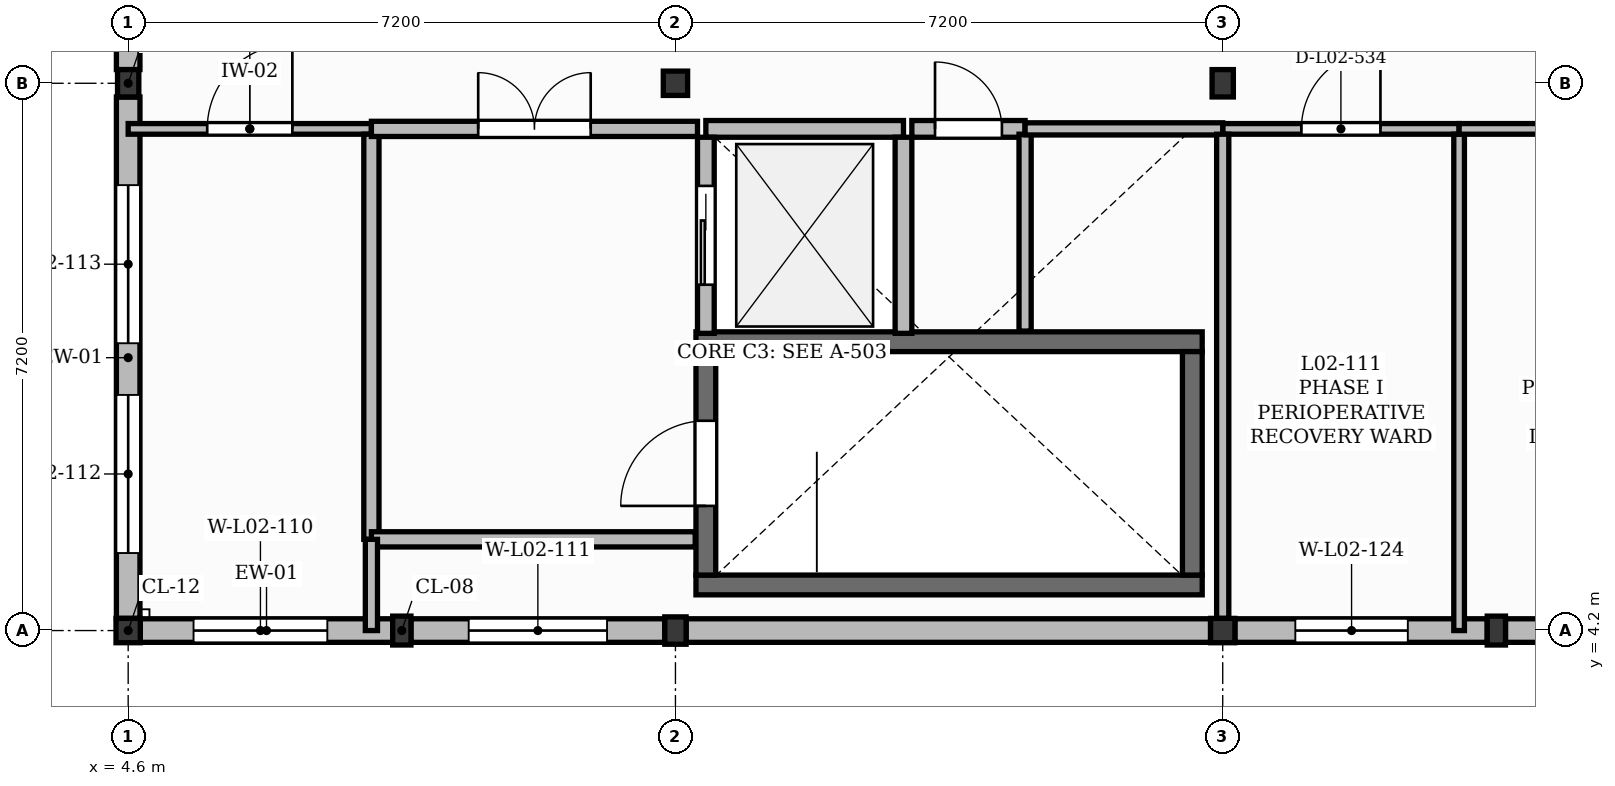
"""IFC4 building model, lengths in metres.
Left out: names, types, materials, properties, quantities, classifications, styles, units other than length and angle.
Written with IfcOpenShell. Run it as: python <this file> out.ifc"""

import sys

from ifc_helpers import new_model, si_unit, direction, frame, frame_2d, origin, origin_2d, place, context, subcontext, project, spatial, rectangle, extrude, element, fill, save


model = new_model("IFC4")
c1 = context("Model", 3, precision=1e-05, world=origin(), true_north=direction((0.0, 1.0)))
c2 = subcontext(c1, "Body", "Model", "MODEL_VIEW")
j1 = project(units=[si_unit("LENGTHUNIT", "METRE"), si_unit("PLANEANGLEUNIT", "RADIAN")], contexts=[c1])
p1 = place(None, origin())
s1 = spatial("IfcSite", under=j1, at=p1, CompositionType="ELEMENT")
p2 = place(p1, origin())
s2 = spatial("IfcBuilding", under=s1, at=p2, CompositionType="ELEMENT")
p3 = place(p2, frame((0.0, 0.0, 9.0)))
s3 = spatial("IfcBuildingStorey", under=s2, at=p3, CompositionType="ELEMENT", Elevation=9.0)
p4 = place(p3, frame((4.6, 4.2, 0.0), z_axis=(0.0, 0.0, 1.0), x_axis=(1.0, 0.0, 0.0)))
e1 = element("IfcColumn", 1, at=p4, inside=s3, PredefinedType="COLUMN", context=c2, shape_type="SweptSolid", body=[
    extrude(rectangle(XDim=0.32, YDim=0.32, at=origin_2d()), origin(), (0.0, 0.0, 1.0), 3.95),
])
for number, where, z_axis, x_axis in (
    (2, (4.6, 11.4, 0.0), (0.0, 0.0, 1.0), (1.0, 0.0, 0.0)),
    (3, (11.8, 4.2, 0.0), (0.0, 0.0, 1.0), (1.0, 0.0, 0.0)),
):
    element("IfcColumn", number, at=place(p3, frame(where, z_axis=z_axis, x_axis=x_axis)), inside=s3, PredefinedType="COLUMN", context=c2, shape_type="SweptSolid", body=[
        extrude(rectangle(XDim=0.28, YDim=0.36, at=origin_2d()), origin(), (0.0, 0.0, 1.0), 3.95),
    ])
for number, where, z_axis, x_axis in (
    (4, (11.8, 11.4, 0.0), (0.0, 0.0, 1.0), (1.0, 0.0, 0.0)),
    (5, (19.0, 4.2, 0.0), (0.0, 0.0, 1.0), (1.0, 0.0, 0.0)),
):
    element("IfcColumn", number, at=place(p3, frame(where, z_axis=z_axis, x_axis=x_axis)), inside=s3, PredefinedType="COLUMN", context=c2, shape_type="SweptSolid", body=[
        extrude(rectangle(XDim=0.32, YDim=0.32, at=origin_2d()), origin(), (0.0, 0.0, 1.0), 3.95),
    ])
p5 = place(p3, frame((19.0, 11.4, 0.0), z_axis=(0.0, 0.0, 1.0), x_axis=(1.0, 0.0, 0.0)))
e6 = element("IfcColumn", 6, at=p5, inside=s3, PredefinedType="COLUMN", context=c2, shape_type="SweptSolid", body=[
    extrude(rectangle(XDim=0.28, YDim=0.36, at=origin_2d()), origin(), (0.0, 0.0, 1.0), 3.95),
])
for number, where, z_axis, x_axis in (
    (7, (8.2, 4.2, 0.0), (0.0, 0.0, 1.0), (1.0, 0.0, 0.0)),
    (8, (22.6, 4.2, 0.0), (0.0, 0.0, 1.0), (1.0, 0.0, 0.0)),
):
    element("IfcColumn", number, at=place(p3, frame(where, z_axis=z_axis, x_axis=x_axis)), inside=s3, PredefinedType="PILASTER", context=c2, shape_type="SweptSolid", body=[
        extrude(rectangle(XDim=0.24, YDim=0.38, at=origin_2d()), origin(), (0.0, 0.0, 1.0), 3.95),
    ])
p6 = place(p3, frame((4.76, 4.2, 0.0), z_axis=(0.0, 0.0, 1.0), x_axis=(1.0, 0.0, 0.0)))
e9 = element("IfcWall", 9, at=p6, inside=s3, PredefinedType="SOLIDWALL", context=c2, shape_type="SweptSolid", body=[
    extrude(rectangle(XDim=3.32, YDim=0.31, at=frame_2d((1.66, 0.0))), origin(), (0.0, 0.0, 1.0), 3.49),
])
p7 = place(p6, frame((0.7, 0.0, 1.0)))
e10 = element("IfcOpeningElement", 10, at=p7, cuts=e9, PredefinedType="OPENING", context=c2, shape_type="SweptSolid", body=[
    extrude(rectangle(XDim=1.76, YDim=1.95, at=frame_2d((0.88, 0.975))), frame((0.0, 0.165, 0.0), z_axis=(0.0, -1.0, 0.0), x_axis=(1.0, 0.0, 0.0)), (0.0, 0.0, 1.0), 0.33),
])
p8 = place(p3, frame((8.32, 4.2, 0.0), z_axis=(0.0, 0.0, 1.0), x_axis=(1.0, 0.0, 0.0)))
e11 = element("IfcWall", 11, at=p8, inside=s3, PredefinedType="SOLIDWALL", context=c2, shape_type="SweptSolid", body=[
    extrude(rectangle(XDim=3.34, YDim=0.31, at=frame_2d((1.67, 0.0))), origin(), (0.0, 0.0, 1.0), 3.49),
])
p9 = place(p8, frame((0.76, 0.0, 1.05)))
e12 = element("IfcOpeningElement", 12, at=p9, cuts=e11, PredefinedType="OPENING", context=c2, shape_type="SweptSolid", body=[
    extrude(rectangle(XDim=1.82, YDim=1.65, at=frame_2d((0.91, 0.825))), frame((0.0, 0.165, 0.0), z_axis=(0.0, -1.0, 0.0), x_axis=(1.0, 0.0, 0.0)), (0.0, 0.0, 1.0), 0.33),
])
p10 = place(p3, frame((4.6, 4.36, 0.0), z_axis=(0.0, 0.0, 1.0), x_axis=(0.0, 1.0, 0.0)))
e13 = element("IfcWall", 13, at=p10, inside=s3, PredefinedType="SOLIDWALL", context=c2, shape_type="SweptSolid", body=[
    extrude(rectangle(XDim=6.86, YDim=0.31, at=frame_2d((3.43, 0.0))), origin(), (0.0, 0.0, 1.0), 3.49),
])
p11 = place(p10, frame((0.86, 0.0, 1.0)))
e14 = element("IfcOpeningElement", 14, at=p11, cuts=e13, PredefinedType="OPENING", context=c2, shape_type="SweptSolid", body=[
    extrude(rectangle(XDim=2.08, YDim=1.8, at=frame_2d((1.04, 0.9))), frame((0.0, 0.165, 0.0), z_axis=(0.0, -1.0, 0.0), x_axis=(1.0, 0.0, 0.0)), (0.0, 0.0, 1.0), 0.33),
])
p12 = place(p10, frame((3.62, 0.0, 1.0)))
e15 = element("IfcOpeningElement", 15, at=p12, cuts=e13, PredefinedType="OPENING", context=c2, shape_type="SweptSolid", body=[
    extrude(rectangle(XDim=2.08, YDim=1.8, at=frame_2d((1.04, 0.9))), frame((0.0, 0.165, 0.0), z_axis=(0.0, -1.0, 0.0), x_axis=(1.0, 0.0, 0.0)), (0.0, 0.0, 1.0), 0.33),
])
p13 = place(p3, frame((4.6, 11.58, 0.0), z_axis=(0.0, 0.0, 1.0), x_axis=(0.0, 1.0, 0.0)))
e16 = element("IfcWall", 16, at=p13, inside=s3, PredefinedType="SOLIDWALL", context=c2, shape_type="SweptSolid", body=[
    extrude(rectangle(XDim=6.86, YDim=0.31, at=frame_2d((3.43, 0.0))), origin(), (0.0, 0.0, 1.0), 3.49),
])
p14 = place(p13, frame((3.65, 0.0, 1.05)))
e17 = element("IfcOpeningElement", 17, at=p14, cuts=e16, PredefinedType="OPENING", context=c2, shape_type="SweptSolid", body=[
    extrude(rectangle(XDim=1.26, YDim=1.65, at=frame_2d((0.63, 0.825))), frame((0.0, 0.165, 0.0), z_axis=(0.0, -1.0, 0.0), x_axis=(1.0, 0.0, 0.0)), (0.0, 0.0, 1.0), 0.33),
])
p15 = place(p3, frame((11.94, 4.2, 0.0), z_axis=(0.0, 0.0, 1.0), x_axis=(1.0, 0.0, 0.0)))
e18 = element("IfcWall", 18, at=p15, inside=s3, PredefinedType="SOLIDWALL", context=c2, shape_type="SweptSolid", body=[
    extrude(rectangle(XDim=6.9, YDim=0.31, at=frame_2d((3.45, 0.0))), origin(), (0.0, 0.0, 1.0), 3.49),
])
p16 = place(p3, frame((19.16, 4.2, 0.0), z_axis=(0.0, 0.0, 1.0), x_axis=(1.0, 0.0, 0.0)))
e19 = element("IfcWall", 19, at=p16, inside=s3, PredefinedType="SOLIDWALL", context=c2, shape_type="SweptSolid", body=[
    extrude(rectangle(XDim=3.32, YDim=0.31, at=frame_2d((1.66, 0.0))), origin(), (0.0, 0.0, 1.0), 3.49),
])
p17 = place(p16, frame((0.795, 0.0, 1.0)))
e20 = element("IfcOpeningElement", 20, at=p17, cuts=e19, PredefinedType="OPENING", context=c2, shape_type="SweptSolid", body=[
    extrude(rectangle(XDim=1.48, YDim=1.95, at=frame_2d((0.74, 0.975))), frame((0.0, 0.165, 0.0), z_axis=(0.0, -1.0, 0.0), x_axis=(1.0, 0.0, 0.0)), (0.0, 0.0, 1.0), 0.33),
])
p18 = place(p3, frame((22.72, 4.2, 0.0), z_axis=(0.0, 0.0, 1.0), x_axis=(1.0, 0.0, 0.0)))
e21 = element("IfcWall", 21, at=p18, inside=s3, PredefinedType="SOLIDWALL", context=c2, shape_type="SweptSolid", body=[
    extrude(rectangle(XDim=3.34, YDim=0.31, at=frame_2d((1.67, 0.0))), origin(), (0.0, 0.0, 1.0), 3.49),
])
p19 = place(p18, frame((0.86, 0.0, 1.0)))
e22 = element("IfcOpeningElement", 22, at=p19, cuts=e21, PredefinedType="OPENING", context=c2, shape_type="SweptSolid", body=[
    extrude(rectangle(XDim=1.62, YDim=1.95, at=frame_2d((0.81, 0.975))), frame((0.0, 0.165, 0.0), z_axis=(0.0, -1.0, 0.0), x_axis=(1.0, 0.0, 0.0)), (0.0, 0.0, 1.0), 0.33),
])
for number, where, z_axis, x_axis in (
    (23, (12.07, 4.8, 0.0), (0.0, 0.0, 1.0), (1.0, 0.0, 0.0)),
    (24, (12.07, 8.0, 0.0), (0.0, 0.0, 1.0), (1.0, 0.0, 0.0)),
):
    element("IfcWall", number, at=place(p3, frame(where, z_axis=z_axis, x_axis=x_axis)), inside=s3, PredefinedType="SHEAR", context=c2, shape_type="SweptSolid", body=[
        extrude(rectangle(XDim=6.66, YDim=0.26, at=frame_2d((3.33, 0.0))), origin(), (0.0, 0.0, 1.0), 3.95),
    ])
p20 = place(p3, frame((12.2, 4.93, 0.0), z_axis=(0.0, 0.0, 1.0), x_axis=(0.0, 1.0, 0.0)))
e25 = element("IfcWall", 25, at=p20, inside=s3, PredefinedType="SHEAR", context=c2, shape_type="SweptSolid", body=[
    extrude(rectangle(XDim=2.94, YDim=0.26, at=frame_2d((1.47, 0.0))), origin(), (0.0, 0.0, 1.0), 3.95),
])
p21 = place(p20, frame((0.91, 0.0, 0.0)))
e26 = element("IfcOpeningElement", 26, at=p21, cuts=e25, PredefinedType="OPENING", context=c2, shape_type="SweptSolid", body=[
    extrude(rectangle(XDim=1.12, YDim=2.1, at=frame_2d((0.56, 1.05))), frame((0.0, 0.14, 0.0), z_axis=(0.0, -1.0, 0.0), x_axis=(1.0, 0.0, 0.0)), (0.0, 0.0, 1.0), 0.28),
])
p22 = place(p3, frame((18.6, 4.93, 0.0), z_axis=(0.0, 0.0, 1.0), x_axis=(0.0, 1.0, 0.0)))
e27 = element("IfcWall", 27, at=p22, inside=s3, PredefinedType="SHEAR", context=c2, shape_type="SweptSolid", body=[
    extrude(rectangle(XDim=2.94, YDim=0.26, at=frame_2d((1.47, 0.0))), origin(), (0.0, 0.0, 1.0), 3.95),
])
p23 = place(p3, frame((12.2, 10.8, 0.0), z_axis=(0.0, 0.0, 1.0), x_axis=(1.0, 0.0, 0.0)))
e28 = element("IfcWall", 28, at=p23, inside=s3, PredefinedType="SOLIDWALL", context=c2, shape_type="SweptSolid", body=[
    extrude(rectangle(XDim=2.6, YDim=0.22, at=frame_2d((1.3, 0.0))), origin(), (0.0, 0.0, 1.0), 3.95),
])
p24 = place(p3, frame((12.2, 8.11, 0.0), z_axis=(0.0, 0.0, 1.0), x_axis=(0.0, 1.0, 0.0)))
e29 = element("IfcWall", 29, at=p24, inside=s3, PredefinedType="SOLIDWALL", context=c2, shape_type="SweptSolid", body=[
    extrude(rectangle(XDim=2.58, YDim=0.22, at=frame_2d((1.29, 0.0))), origin(), (0.0, 0.0, 1.0), 3.95),
])
p25 = place(p24, frame((0.64, 0.0, 0.0)))
e30 = element("IfcOpeningElement", 30, at=p25, cuts=e29, PredefinedType="OPENING", context=c2, shape_type="SweptSolid", body=[
    extrude(rectangle(XDim=1.3, YDim=2.2, at=frame_2d((0.65, 1.1))), frame((0.0, 0.12, 0.0), z_axis=(0.0, -1.0, 0.0), x_axis=(1.0, 0.0, 0.0)), (0.0, 0.0, 1.0), 0.24),
])
p26 = place(p3, frame((14.8, 8.11, 0.0), z_axis=(0.0, 0.0, 1.0), x_axis=(0.0, 1.0, 0.0)))
e31 = element("IfcWall", 31, at=p26, inside=s3, PredefinedType="SOLIDWALL", context=c2, shape_type="SweptSolid", body=[
    extrude(rectangle(XDim=2.58, YDim=0.22, at=frame_2d((1.29, 0.0))), origin(), (0.0, 0.0, 1.0), 3.95),
])
p27 = place(p3, frame((4.6, 10.8, 0.0), z_axis=(0.0, 0.0, 1.0), x_axis=(1.0, 0.0, 0.0)))
e32 = element("IfcWall", 32, at=p27, inside=s3, PredefinedType="PARTITIONING", context=c2, shape_type="SweptSolid", body=[
    extrude(rectangle(XDim=3.2, YDim=0.14, at=frame_2d((1.6, 0.0))), origin(), (0.0, 0.0, 1.0), 3.91),
])
p28 = place(p27, frame((1.04, 0.0, 0.0)))
e33 = element("IfcOpeningElement", 33, at=p28, cuts=e32, PredefinedType="OPENING", context=c2, shape_type="SweptSolid", body=[
    extrude(rectangle(XDim=1.12, YDim=2.15, at=frame_2d((0.56, 1.075))), frame((0.0, 0.08, 0.0), z_axis=(0.0, -1.0, 0.0), x_axis=(1.0, 0.0, 0.0)), (0.0, 0.0, 1.0), 0.16),
])
p29 = place(p3, frame((7.8, 5.4, 0.0), z_axis=(0.0, 0.0, 1.0), x_axis=(0.0, 1.0, 0.0)))
e34 = element("IfcWall", 34, at=p29, inside=s3, PredefinedType="PARTITIONING", context=c2, shape_type="SweptSolid", body=[
    extrude(rectangle(XDim=5.33, YDim=0.2, at=frame_2d((2.665, 0.0))), origin(), (0.0, 0.0, 1.0), 3.91),
])
p30 = place(p3, frame((7.8, 10.8, 0.0), z_axis=(0.0, 0.0, 1.0), x_axis=(1.0, 0.0, 0.0)))
e35 = element("IfcWall", 35, at=p30, inside=s3, PredefinedType="PARTITIONING", context=c2, shape_type="SweptSolid", body=[
    extrude(rectangle(XDim=4.29, YDim=0.2, at=frame_2d((2.145, 0.0))), origin(), (0.0, 0.0, 1.0), 3.91),
])
p31 = place(p30, frame((1.405, 0.0, 0.0)))
e36 = element("IfcOpeningElement", 36, at=p31, cuts=e35, PredefinedType="OPENING", context=c2, shape_type="SweptSolid", body=[
    extrude(rectangle(XDim=1.48, YDim=2.25, at=frame_2d((0.74, 1.125))), frame((0.0, 0.11, 0.0), z_axis=(0.0, -1.0, 0.0), x_axis=(1.0, 0.0, 0.0)), (0.0, 0.0, 1.0), 0.22),
])
p32 = place(p3, frame((14.91, 10.8, 0.0), z_axis=(0.0, 0.0, 1.0), x_axis=(1.0, 0.0, 0.0)))
e37 = element("IfcWall", 37, at=p32, inside=s3, PredefinedType="SOLIDWALL", context=c2, shape_type="SweptSolid", body=[
    extrude(rectangle(XDim=1.49, YDim=0.22, at=frame_2d((0.745, 0.0))), origin(), (0.0, 0.0, 1.0), 3.91),
])
p33 = place(p32, frame((0.305, 0.0, 0.0)))
e38 = element("IfcOpeningElement", 38, at=p33, cuts=e37, PredefinedType="OPENING", context=c2, shape_type="SweptSolid", body=[
    extrude(rectangle(XDim=0.88, YDim=2.05, at=frame_2d((0.44, 1.025))), frame((0.0, 0.12, 0.0), z_axis=(0.0, -1.0, 0.0), x_axis=(1.0, 0.0, 0.0)), (0.0, 0.0, 1.0), 0.24),
])
p34 = place(p3, frame((19.0, 10.8, 0.0), z_axis=(0.0, 0.0, 1.0), x_axis=(1.0, 0.0, 0.0)))
e39 = element("IfcWall", 39, at=p34, inside=s3, PredefinedType="PARTITIONING", context=c2, shape_type="SweptSolid", body=[
    extrude(rectangle(XDim=3.11, YDim=0.14, at=frame_2d((1.555, 0.0))), origin(), (0.0, 0.0, 1.0), 3.91),
])
p35 = place(p34, frame((1.035, 0.0, 0.0)))
e40 = element("IfcOpeningElement", 40, at=p35, cuts=e39, PredefinedType="OPENING", context=c2, shape_type="SweptSolid", body=[
    extrude(rectangle(XDim=1.04, YDim=2.1, at=frame_2d((0.52, 1.05))), frame((0.0, 0.08, 0.0), z_axis=(0.0, -1.0, 0.0), x_axis=(1.0, 0.0, 0.0)), (0.0, 0.0, 1.0), 0.16),
])
p36 = place(p3, frame((22.11, 4.2, 0.0), z_axis=(0.0, 0.0, 1.0), x_axis=(0.0, 1.0, 0.0)))
e41 = element("IfcWall", 41, at=p36, inside=s3, PredefinedType="PARTITIONING", context=c2, shape_type="SweptSolid", body=[
    extrude(rectangle(XDim=6.53, YDim=0.14, at=frame_2d((3.265, 0.0))), origin(), (0.0, 0.0, 1.0), 3.91),
])
p37 = place(p3, frame((22.11, 10.8, 0.0), z_axis=(0.0, 0.0, 1.0), x_axis=(1.0, 0.0, 0.0)))
e42 = element("IfcWall", 42, at=p37, inside=s3, PredefinedType="PARTITIONING", context=c2, shape_type="SweptSolid", body=[
    extrude(rectangle(XDim=4.09, YDim=0.14, at=frame_2d((2.045, 0.0))), origin(), (0.0, 0.0, 1.0), 3.91),
])
p38 = place(p37, frame((1.485, 0.0, 0.0)))
e43 = element("IfcOpeningElement", 43, at=p38, cuts=e42, PredefinedType="OPENING", context=c2, shape_type="SweptSolid", body=[
    extrude(rectangle(XDim=1.12, YDim=2.15, at=frame_2d((0.56, 1.075))), frame((0.0, 0.08, 0.0), z_axis=(0.0, -1.0, 0.0), x_axis=(1.0, 0.0, 0.0)), (0.0, 0.0, 1.0), 0.16),
])
p39 = place(p3, frame((16.4, 8.14, 0.0), z_axis=(0.0, 0.0, 1.0), x_axis=(0.0, 1.0, 0.0)))
e44 = element("IfcWall", 44, at=p39, inside=s3, PredefinedType="PARTITIONING", context=c2, shape_type="SweptSolid", body=[
    extrude(rectangle(XDim=2.59, YDim=0.16, at=frame_2d((1.295, 0.0))), origin(), (0.0, 0.0, 1.0), 3.91),
])
p40 = place(p3, frame((7.8, 5.4, 0.0), z_axis=(0.0, 0.0, 1.0), x_axis=(1.0, 0.0, 0.0)))
e45 = element("IfcWall", 45, at=p40, inside=s3, PredefinedType="PARTITIONING", context=c2, shape_type="SweptSolid", body=[
    extrude(rectangle(XDim=4.26, YDim=0.2, at=frame_2d((2.13, 0.0))), origin(), (0.0, 0.0, 1.0), 3.91),
])
p41 = place(p3, frame((16.4, 10.8, 0.0), z_axis=(0.0, 0.0, 1.0), x_axis=(1.0, 0.0, 0.0)))
e46 = element("IfcWall", 46, at=p41, inside=s3, PredefinedType="PARTITIONING", context=c2, shape_type="SweptSolid", body=[
    extrude(rectangle(XDim=2.6, YDim=0.16, at=frame_2d((1.3, 0.0))), origin(), (0.0, 0.0, 1.0), 3.96),
])
p42 = place(p3, frame((7.8, 4.2, 0.0), z_axis=(0.0, 0.0, 1.0), x_axis=(0.0, 1.0, 0.0)))
e47 = element("IfcWall", 47, at=p42, inside=s3, PredefinedType="PARTITIONING", context=c2, shape_type="SweptSolid", body=[
    extrude(rectangle(XDim=1.2, YDim=0.16, at=frame_2d((0.6, 0.0))), origin(), (0.0, 0.0, 1.0), 3.91),
])
p43 = place(p3, frame((19.0, 4.36, 0.0), z_axis=(0.0, 0.0, 1.0), x_axis=(0.0, 1.0, 0.0)))
e48 = element("IfcWall", 48, at=p43, inside=s3, PredefinedType="PARTITIONING", context=c2, shape_type="SweptSolid", body=[
    extrude(rectangle(XDim=6.37, YDim=0.16, at=frame_2d((3.185, 0.0))), origin(), (0.0, 0.0, 1.0), 3.49),
])
p44 = place(p7, origin())
e49 = element("IfcWindow", 49, at=p44, inside=s3, PartitioningType="DOUBLE_PANEL_VERTICAL", PredefinedType="WINDOW", context=c2, shape_type="SweptSolid", body=[
    extrude(rectangle(XDim=1.76, YDim=1.95, at=frame_2d((0.88, 0.975))), frame((0.0, 0.03, 0.0), z_axis=(0.0, -1.0, 0.0), x_axis=(1.0, 0.0, 0.0)), (0.0, 0.0, 1.0), 0.06),
])
fill(e10, e49)
p45 = place(p9, origin())
e50 = element("IfcWindow", 50, at=p45, inside=s3, PartitioningType="DOUBLE_PANEL_VERTICAL", PredefinedType="WINDOW", context=c2, shape_type="SweptSolid", body=[
    extrude(rectangle(XDim=1.82, YDim=1.65, at=frame_2d((0.91, 0.825))), frame((0.0, 0.03, 0.0), z_axis=(0.0, -1.0, 0.0), x_axis=(1.0, 0.0, 0.0)), (0.0, 0.0, 1.0), 0.06),
])
fill(e12, e50)
p46 = place(p11, origin())
e51 = element("IfcWindow", 51, at=p46, inside=s3, PartitioningType="DOUBLE_PANEL_VERTICAL", PredefinedType="WINDOW", context=c2, shape_type="SweptSolid", body=[
    extrude(rectangle(XDim=2.08, YDim=1.8, at=frame_2d((1.04, 0.9))), frame((0.0, 0.03, 0.0), z_axis=(0.0, -1.0, 0.0), x_axis=(1.0, 0.0, 0.0)), (0.0, 0.0, 1.0), 0.06),
])
fill(e14, e51)
p47 = place(p12, origin())
e52 = element("IfcWindow", 52, at=p47, inside=s3, PartitioningType="DOUBLE_PANEL_VERTICAL", PredefinedType="WINDOW", context=c2, shape_type="SweptSolid", body=[
    extrude(rectangle(XDim=2.08, YDim=1.8, at=frame_2d((1.04, 0.9))), frame((0.0, 0.03, 0.0), z_axis=(0.0, -1.0, 0.0), x_axis=(1.0, 0.0, 0.0)), (0.0, 0.0, 1.0), 0.06),
])
fill(e15, e52)
p48 = place(p17, origin())
e53 = element("IfcWindow", 53, at=p48, inside=s3, PartitioningType="SINGLE_PANEL", PredefinedType="WINDOW", context=c2, shape_type="SweptSolid", body=[
    extrude(rectangle(XDim=1.48, YDim=1.95, at=frame_2d((0.74, 0.975))), frame((0.0, 0.03, 0.0), z_axis=(0.0, -1.0, 0.0), x_axis=(1.0, 0.0, 0.0)), (0.0, 0.0, 1.0), 0.06),
])
fill(e20, e53)
p49 = place(p25, origin())
e54 = element("IfcDoor", 54, at=p49, inside=s3, OperationType="SLIDING_TO_LEFT", PredefinedType="DOOR", context=c2, shape_type="SweptSolid", body=[
    extrude(rectangle(XDim=1.3, YDim=2.2, at=frame_2d((0.65, 1.1))), frame((0.0, 0.025, 0.0), z_axis=(0.0, -1.0, 0.0), x_axis=(1.0, 0.0, 0.0)), (0.0, 0.0, 1.0), 0.05),
])
fill(e30, e54)
p50 = place(p21, origin())
e55 = element("IfcDoor", 55, at=p50, inside=s3, OperationType="SINGLE_SWING_LEFT", PredefinedType="DOOR", context=c2, shape_type="SweptSolid", body=[
    extrude(rectangle(XDim=1.12, YDim=2.1, at=frame_2d((0.56, 1.05))), frame((0.0, 0.025, 0.0), z_axis=(0.0, -1.0, 0.0), x_axis=(1.0, 0.0, 0.0)), (0.0, 0.0, 1.0), 0.05),
])
fill(e26, e55)
p51 = place(p31, origin())
e56 = element("IfcDoor", 56, at=p51, inside=s3, OperationType="DOUBLE_DOOR_SINGLE_SWING", PredefinedType="DOOR", context=c2, shape_type="SweptSolid", body=[
    extrude(rectangle(XDim=1.48, YDim=2.25, at=frame_2d((0.74, 1.125))), frame((0.0, 0.025, 0.0), z_axis=(0.0, -1.0, 0.0), x_axis=(1.0, 0.0, 0.0)), (0.0, 0.0, 1.0), 0.05),
])
fill(e36, e56)
p52 = place(p33, origin())
e57 = element("IfcDoor", 57, at=p52, inside=s3, OperationType="SINGLE_SWING_LEFT", PredefinedType="DOOR", context=c2, shape_type="SweptSolid", body=[
    extrude(rectangle(XDim=0.88, YDim=2.05, at=frame_2d((0.44, 1.025))), frame((0.0, 0.025, 0.0), z_axis=(0.0, -1.0, 0.0), x_axis=(1.0, 0.0, 0.0)), (0.0, 0.0, 1.0), 0.05),
])
fill(e38, e57)
p53 = place(p28, origin())
e58 = element("IfcDoor", 58, at=p53, inside=s3, OperationType="SINGLE_SWING_RIGHT", PredefinedType="DOOR", context=c2, shape_type="SweptSolid", body=[
    extrude(rectangle(XDim=1.12, YDim=2.15, at=frame_2d((0.56, 1.075))), frame((0.0, 0.025, 0.0), z_axis=(0.0, -1.0, 0.0), x_axis=(1.0, 0.0, 0.0)), (0.0, 0.0, 1.0), 0.05),
])
fill(e33, e58)
p54 = place(p35, origin())
e59 = element("IfcDoor", 59, at=p54, inside=s3, OperationType="SINGLE_SWING_RIGHT", PredefinedType="DOOR", context=c2, shape_type="SweptSolid", body=[
    extrude(rectangle(XDim=1.04, YDim=2.1, at=frame_2d((0.52, 1.05))), frame((0.0, 0.025, 0.0), z_axis=(0.0, -1.0, 0.0), x_axis=(1.0, 0.0, 0.0)), (0.0, 0.0, 1.0), 0.05),
])
fill(e40, e59)
save(model, sys.argv[1])
